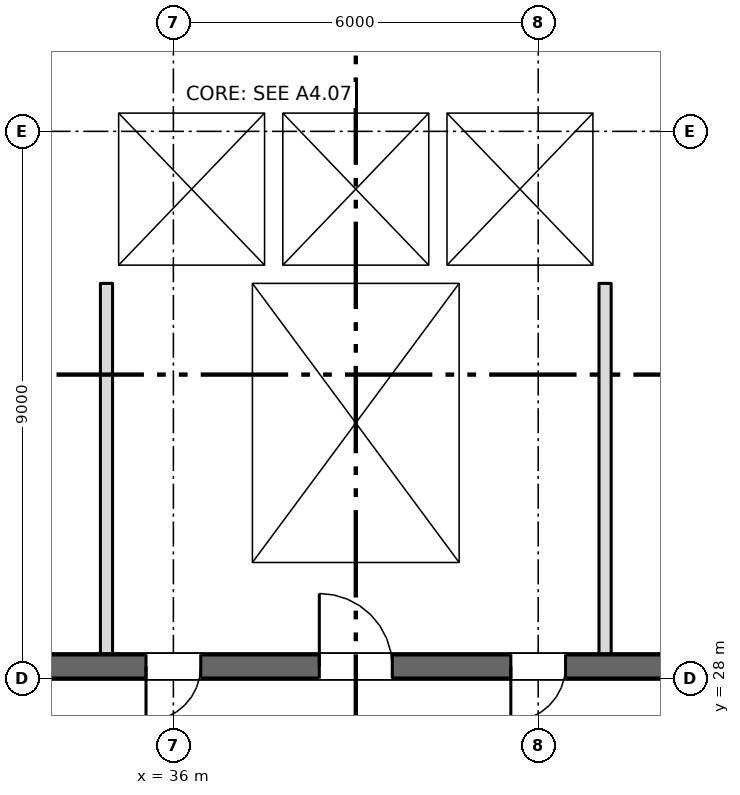
"""IFC4 building model, lengths in metres.
Left out: names, types, materials, properties, quantities, classifications, styles, units other than length and angle.
Written with IfcOpenShell. Run it as: python <this file> out.ifc"""

import sys

from ifc_helpers import new_model, si_unit, direction, frame, frame_2d, origin, place, context, subcontext, project, spatial, rectangle, extrude, element, fill, save


model = new_model("IFC4")
c1 = context("Model", 3, precision=1e-05, world=origin(), true_north=direction((0.0, 1.0)))
c2 = subcontext(c1, "Body", "Model", "MODEL_VIEW")
j1 = project(units=[si_unit("LENGTHUNIT", "METRE"), si_unit("PLANEANGLEUNIT", "RADIAN")], contexts=[c1])
p1 = place(None, origin())
s1 = spatial("IfcSite", under=j1, at=p1, CompositionType="ELEMENT")
p2 = place(p1, origin())
s2 = spatial("IfcBuilding", under=s1, at=p2, CompositionType="ELEMENT")
p3 = place(p2, frame((0.0, 0.0, 22.5)))
s3 = spatial("IfcBuildingStorey", under=s2, at=p3, CompositionType="ELEMENT", Elevation=22.5)
p4 = place(p3, frame((6.7, 28.2, 0.0), z_axis=(0.0, 0.0, 1.0), x_axis=(1.0, 0.0, 0.0)))
e1 = element("IfcWall", 1, at=p4, inside=s3, PredefinedType="SHEAR", context=c2, shape_type="SweptSolid", body=[
    extrude(rectangle(XDim=57.8, YDim=0.4, at=frame_2d((28.9, 0.0))), origin(), (0.0, 0.0, 1.0), 3.35),
])
p5 = place(p4, frame((12.562, 0.0, 0.0)))
e2 = element("IfcOpeningElement", 2, at=p5, cuts=e1, PredefinedType="OPENING", context=c2, shape_type="SweptSolid", body=[
    extrude(rectangle(XDim=0.9, YDim=2.1, at=frame_2d((0.45, 1.05))), frame((0.0, 0.21, 0.0), z_axis=(0.0, -1.0, 0.0), x_axis=(1.0, 0.0, 0.0)), (0.0, 0.0, 1.0), 0.42),
])
p6 = place(p4, frame((15.137, 0.0, 0.0)))
e3 = element("IfcOpeningElement", 3, at=p6, cuts=e1, PredefinedType="OPENING", context=c2, shape_type="SweptSolid", body=[
    extrude(rectangle(XDim=0.9, YDim=2.1, at=frame_2d((0.45, 1.05))), frame((0.0, 0.21, 0.0), z_axis=(0.0, -1.0, 0.0), x_axis=(1.0, 0.0, 0.0)), (0.0, 0.0, 1.0), 0.42),
])
p7 = place(p4, frame((49.85, 0.0, 0.0)))
e4 = element("IfcOpeningElement", 4, at=p7, cuts=e1, PredefinedType="OPENING", context=c2, shape_type="SweptSolid", body=[
    extrude(rectangle(XDim=0.9, YDim=2.1, at=frame_2d((0.45, 1.05))), frame((0.0, 0.21, 0.0), z_axis=(0.0, -1.0, 0.0), x_axis=(1.0, 0.0, 0.0)), (0.0, 0.0, 1.0), 0.42),
])
p8 = place(p4, frame((0.562, 0.0, 0.0)))
e5 = element("IfcOpeningElement", 5, at=p8, cuts=e1, PredefinedType="OPENING", context=c2, shape_type="SweptSolid", body=[
    extrude(rectangle(XDim=0.9, YDim=2.1, at=frame_2d((0.45, 1.05))), frame((0.0, 0.21, 0.0), z_axis=(0.0, -1.0, 0.0), x_axis=(1.0, 0.0, 0.0)), (0.0, 0.0, 1.0), 0.42),
])
p9 = place(p4, frame((2.137, 0.0, 0.0)))
e6 = element("IfcOpeningElement", 6, at=p9, cuts=e1, PredefinedType="OPENING", context=c2, shape_type="SweptSolid", body=[
    extrude(rectangle(XDim=0.9, YDim=2.1, at=frame_2d((0.45, 1.05))), frame((0.0, 0.21, 0.0), z_axis=(0.0, -1.0, 0.0), x_axis=(1.0, 0.0, 0.0)), (0.0, 0.0, 1.0), 0.42),
])
p10 = place(p4, frame((4.7, 0.0, 0.0)))
e7 = element("IfcOpeningElement", 7, at=p10, cuts=e1, PredefinedType="OPENING", context=c2, shape_type="SweptSolid", body=[
    extrude(rectangle(XDim=1.2, YDim=2.1, at=frame_2d((0.6, 1.05))), frame((0.0, 0.21, 0.0), z_axis=(0.0, -1.0, 0.0), x_axis=(1.0, 0.0, 0.0)), (0.0, 0.0, 1.0), 0.42),
])
p11 = place(p4, frame((31.7, 0.0, 0.0)))
e8 = element("IfcOpeningElement", 8, at=p11, cuts=e1, PredefinedType="OPENING", context=c2, shape_type="SweptSolid", body=[
    extrude(rectangle(XDim=1.2, YDim=2.1, at=frame_2d((0.6, 1.05))), frame((0.0, 0.21, 0.0), z_axis=(0.0, -1.0, 0.0), x_axis=(1.0, 0.0, 0.0)), (0.0, 0.0, 1.0), 0.42),
])
p12 = place(p4, frame((55.2, 0.0, 0.0)))
e9 = element("IfcOpeningElement", 9, at=p12, cuts=e1, PredefinedType="OPENING", context=c2, shape_type="SweptSolid", body=[
    extrude(rectangle(XDim=1.2, YDim=2.1, at=frame_2d((0.6, 1.05))), frame((0.0, 0.21, 0.0), z_axis=(0.0, -1.0, 0.0), x_axis=(1.0, 0.0, 0.0)), (0.0, 0.0, 1.0), 0.42),
])
p13 = place(p4, frame((21.7, 0.0, 0.0)))
e10 = element("IfcOpeningElement", 10, at=p13, cuts=e1, PredefinedType="OPENING", context=c2, shape_type="SweptSolid", body=[
    extrude(rectangle(XDim=1.2, YDim=2.1, at=frame_2d((0.6, 1.05))), frame((0.0, 0.21, 0.0), z_axis=(0.0, -1.0, 0.0), x_axis=(1.0, 0.0, 0.0)), (0.0, 0.0, 1.0), 0.42),
])
p14 = place(p4, frame((41.7, 0.0, 0.0)))
e11 = element("IfcOpeningElement", 11, at=p14, cuts=e1, PredefinedType="OPENING", context=c2, shape_type="SweptSolid", body=[
    extrude(rectangle(XDim=1.2, YDim=2.1, at=frame_2d((0.6, 1.05))), frame((0.0, 0.21, 0.0), z_axis=(0.0, -1.0, 0.0), x_axis=(1.0, 0.0, 0.0)), (0.0, 0.0, 1.0), 0.42),
])
p15 = place(p4, frame((24.85, 0.0, 0.0)))
e12 = element("IfcOpeningElement", 12, at=p15, cuts=e1, PredefinedType="OPENING", context=c2, shape_type="SweptSolid", body=[
    extrude(rectangle(XDim=2.4, YDim=2.1, at=frame_2d((1.2, 1.05))), frame((0.0, 0.21, 0.0), z_axis=(0.0, -1.0, 0.0), x_axis=(1.0, 0.0, 0.0)), (0.0, 0.0, 1.0), 0.42),
])
p16 = place(p4, frame((37.35, 0.0, 0.0)))
e13 = element("IfcOpeningElement", 13, at=p16, cuts=e1, PredefinedType="OPENING", context=c2, shape_type="SweptSolid", body=[
    extrude(rectangle(XDim=2.4, YDim=2.1, at=frame_2d((1.2, 1.05))), frame((0.0, 0.21, 0.0), z_axis=(0.0, -1.0, 0.0), x_axis=(1.0, 0.0, 0.0)), (0.0, 0.0, 1.0), 0.42),
])
p17 = place(p4, frame((7.85, 0.0, 0.0)))
e14 = element("IfcOpeningElement", 14, at=p17, cuts=e1, PredefinedType="OPENING", context=c2, shape_type="SweptSolid", body=[
    extrude(rectangle(XDim=2.4, YDim=2.1, at=frame_2d((1.2, 1.05))), frame((0.0, 0.21, 0.0), z_axis=(0.0, -1.0, 0.0), x_axis=(1.0, 0.0, 0.0)), (0.0, 0.0, 1.0), 0.42),
])
p18 = place(p4, frame((28.85, 0.0, 0.0)))
e15 = element("IfcOpeningElement", 15, at=p18, cuts=e1, PredefinedType="OPENING", context=c2, shape_type="SweptSolid", body=[
    extrude(rectangle(XDim=0.9, YDim=2.1, at=frame_2d((0.45, 1.05))), frame((0.0, 0.21, 0.0), z_axis=(0.0, -1.0, 0.0), x_axis=(1.0, 0.0, 0.0)), (0.0, 0.0, 1.0), 0.42),
])
p19 = place(p4, frame((34.85, 0.0, 0.0)))
e16 = element("IfcOpeningElement", 16, at=p19, cuts=e1, PredefinedType="OPENING", context=c2, shape_type="SweptSolid", body=[
    extrude(rectangle(XDim=0.9, YDim=2.1, at=frame_2d((0.45, 1.05))), frame((0.0, 0.21, 0.0), z_axis=(0.0, -1.0, 0.0), x_axis=(1.0, 0.0, 0.0)), (0.0, 0.0, 1.0), 0.42),
])
for number, where, z_axis, x_axis in (
    (17, (37.15, 28.4, 0.0), (0.0, 0.0, 1.0), (0.0, 1.0, 0.0)),
    (18, (40.85, 28.4, 0.0), (0.0, 0.0, 1.0), (0.0, 1.0, 0.0)),
):
    element("IfcWall", number, at=place(p3, frame(where, z_axis=z_axis, x_axis=x_axis)), inside=s3, PredefinedType="SHEAR", context=c2, shape_type="SweptSolid", body=[
        extrude(rectangle(XDim=6.1, YDim=0.3, at=frame_2d((3.05, 0.0))), origin(), (0.0, 0.0, 1.0), 3.35),
    ])
p20 = place(p3, frame((34.8, 34.65, 0.0), z_axis=(0.0, 0.0, 1.0), x_axis=(1.0, 0.0, 0.0)))
e19 = element("IfcWall", 19, at=p20, inside=s3, PredefinedType="SHEAR", context=c2, shape_type="SweptSolid", body=[
    extrude(rectangle(XDim=8.4, YDim=0.3, at=frame_2d((4.2, 0.0))), origin(), (0.0, 0.0, 1.0), 3.35),
])
p21 = place(p3, frame((34.8, 37.45, 0.0), z_axis=(0.0, 0.0, 1.0), x_axis=(1.0, 0.0, 0.0)))
e20 = element("IfcWall", 20, at=p21, inside=s3, PredefinedType="SHEAR", context=c2, shape_type="SweptSolid", body=[
    extrude(rectangle(XDim=8.4, YDim=0.3, at=frame_2d((4.2, 0.0))), origin(), (0.0, 0.0, 1.0), 3.35),
])
p22 = place(p21, frame((0.95, 0.0, 0.0)))
e21 = element("IfcOpeningElement", 21, at=p22, cuts=e20, PredefinedType="OPENING", context=c2, shape_type="SweptSolid", body=[
    extrude(rectangle(XDim=1.1, YDim=2.1, at=frame_2d((0.55, 1.05))), frame((0.0, 0.16, 0.0), z_axis=(0.0, -1.0, 0.0), x_axis=(1.0, 0.0, 0.0)), (0.0, 0.0, 1.0), 0.32),
])
p23 = place(p21, frame((3.65, 0.0, 0.0)))
e22 = element("IfcOpeningElement", 22, at=p23, cuts=e20, PredefinedType="OPENING", context=c2, shape_type="SweptSolid", body=[
    extrude(rectangle(XDim=1.1, YDim=2.1, at=frame_2d((0.55, 1.05))), frame((0.0, 0.16, 0.0), z_axis=(0.0, -1.0, 0.0), x_axis=(1.0, 0.0, 0.0)), (0.0, 0.0, 1.0), 0.32),
])
p24 = place(p21, frame((6.35, 0.0, 0.0)))
e23 = element("IfcOpeningElement", 23, at=p24, cuts=e20, PredefinedType="OPENING", context=c2, shape_type="SweptSolid", body=[
    extrude(rectangle(XDim=1.1, YDim=2.1, at=frame_2d((0.55, 1.05))), frame((0.0, 0.16, 0.0), z_axis=(0.0, -1.0, 0.0), x_axis=(1.0, 0.0, 0.0)), (0.0, 0.0, 1.0), 0.32),
])
for number, where, z_axis, x_axis in (
    (24, (34.95, 34.8, 0.0), (0.0, 0.0, 1.0), (0.0, 1.0, 0.0)),
    (25, (43.05, 34.8, 0.0), (0.0, 0.0, 1.0), (0.0, 1.0, 0.0)),
    (26, (37.65, 34.8, 0.0), (0.0, 0.0, 1.0), (0.0, 1.0, 0.0)),
    (27, (40.35, 34.8, 0.0), (0.0, 0.0, 1.0), (0.0, 1.0, 0.0)),
):
    element("IfcWall", number, at=place(p3, frame(where, z_axis=z_axis, x_axis=x_axis)), inside=s3, PredefinedType="SHEAR", context=c2, shape_type="SweptSolid", body=[
        extrude(rectangle(XDim=2.5, YDim=0.3, at=frame_2d((1.25, 0.0))), origin(), (0.0, 0.0, 1.0), 3.35),
    ])
for number, where, z_axis, x_axis in (
    (28, (34.9, 28.4, 0.0), (0.0, 0.0, 1.0), (0.0, 1.0, 0.0)),
    (29, (43.1, 28.4, 0.0), (0.0, 0.0, 1.0), (0.0, 1.0, 0.0)),
):
    element("IfcWall", number, at=place(p3, frame(where, z_axis=z_axis, x_axis=x_axis)), inside=s3, PredefinedType="PARTITIONING", context=c2, shape_type="SweptSolid", body=[
        extrude(rectangle(XDim=6.1, YDim=0.2, at=frame_2d((3.05, 0.0))), origin(), (0.0, 0.0, 1.0), 3.35),
    ])
p25 = place(p22, origin())
e30 = element("IfcDoor", 30, at=p25, inside=s3, OperationType="SLIDING_TO_LEFT", PredefinedType="DOOR", context=c2, shape_type="SweptSolid", body=[
    extrude(rectangle(XDim=1.1, YDim=2.1, at=frame_2d((0.55, 1.05))), frame((0.0, 0.025, 0.0), z_axis=(0.0, -1.0, 0.0), x_axis=(1.0, 0.0, 0.0)), (0.0, 0.0, 1.0), 0.05),
])
fill(e21, e30)
p26 = place(p23, origin())
e31 = element("IfcDoor", 31, at=p26, inside=s3, OperationType="SLIDING_TO_LEFT", PredefinedType="DOOR", context=c2, shape_type="SweptSolid", body=[
    extrude(rectangle(XDim=1.1, YDim=2.1, at=frame_2d((0.55, 1.05))), frame((0.0, 0.025, 0.0), z_axis=(0.0, -1.0, 0.0), x_axis=(1.0, 0.0, 0.0)), (0.0, 0.0, 1.0), 0.05),
])
fill(e22, e31)
p27 = place(p24, origin())
e32 = element("IfcDoor", 32, at=p27, inside=s3, OperationType="SLIDING_TO_LEFT", PredefinedType="DOOR", context=c2, shape_type="SweptSolid", body=[
    extrude(rectangle(XDim=1.1, YDim=2.1, at=frame_2d((0.55, 1.05))), frame((0.0, 0.025, 0.0), z_axis=(0.0, -1.0, 0.0), x_axis=(1.0, 0.0, 0.0)), (0.0, 0.0, 1.0), 0.05),
])
fill(e23, e32)
p28 = place(p11, origin())
e33 = element("IfcDoor", 33, at=p28, inside=s3, OperationType="SINGLE_SWING_LEFT", PredefinedType="DOOR", context=c2, shape_type="SweptSolid", body=[
    extrude(rectangle(XDim=1.2, YDim=2.1, at=frame_2d((0.6, 1.05))), frame((0.0, 0.025, 0.0), z_axis=(0.0, -1.0, 0.0), x_axis=(1.0, 0.0, 0.0)), (0.0, 0.0, 1.0), 0.05),
])
fill(e8, e33)
p29 = place(p18, origin())
e34 = element("IfcDoor", 34, at=p29, inside=s3, OperationType="SINGLE_SWING_LEFT", PredefinedType="DOOR", context=c2, shape_type="SweptSolid", body=[
    extrude(rectangle(XDim=0.9, YDim=2.1, at=frame_2d((0.45, 1.05))), frame((0.0, 0.025, 0.0), z_axis=(0.0, -1.0, 0.0), x_axis=(1.0, 0.0, 0.0)), (0.0, 0.0, 1.0), 0.05),
])
fill(e15, e34)
p30 = place(p19, origin())
e35 = element("IfcDoor", 35, at=p30, inside=s3, OperationType="SINGLE_SWING_LEFT", PredefinedType="DOOR", context=c2, shape_type="SweptSolid", body=[
    extrude(rectangle(XDim=0.9, YDim=2.1, at=frame_2d((0.45, 1.05))), frame((0.0, 0.025, 0.0), z_axis=(0.0, -1.0, 0.0), x_axis=(1.0, 0.0, 0.0)), (0.0, 0.0, 1.0), 0.05),
])
fill(e16, e35)
save(model, sys.argv[1])
